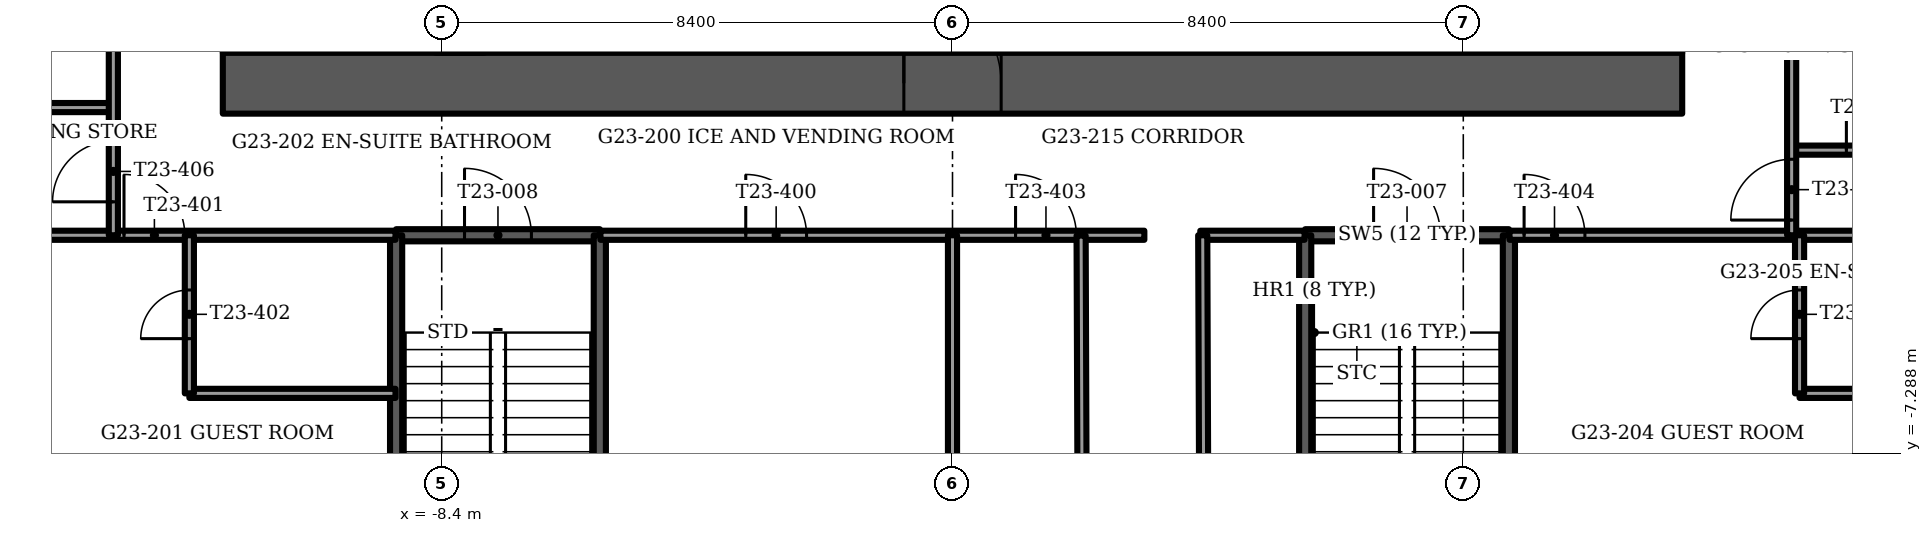
"""IFC4 building model, lengths in metres.
Left out: names, types, materials, properties, quantities, classifications, styles, units other than length and angle.
Written with IfcOpenShell. Run it as: python <this file> out.ifc"""

import sys

from ifc_helpers import new_model, si_unit, direction, frame, frame_2d, origin, place, context, subcontext, project, spatial, rectangle, extrude, element, fill, save


model = new_model("IFC4")
c1 = context("Model", 3, precision=1e-05, world=origin(), true_north=direction((0.0, 1.0)))
c2 = subcontext(c1, "Body", "Model", "MODEL_VIEW")
j1 = project(units=[si_unit("LENGTHUNIT", "METRE"), si_unit("PLANEANGLEUNIT", "RADIAN")], contexts=[c1])
p1 = place(None, origin())
s1 = spatial("IfcSite", under=j1, at=p1, CompositionType="ELEMENT")
p2 = place(p1, origin())
s2 = spatial("IfcBuilding", under=s1, at=p2, CompositionType="ELEMENT")
p3 = place(p2, frame((0.0, 0.0, 93.0)))
s3 = spatial("IfcBuildingStorey", under=s2, at=p3, CompositionType="ELEMENT", Elevation=93.0)
p4 = place(p3, frame((-12.0, -1.2, -0.3), z_axis=(0.0, 0.0, 1.0), x_axis=(1.0, 0.0, 0.0)))
e1 = element("IfcWall", 1, at=p4, inside=s3, PredefinedType="SHEAR", context=c2, shape_type="SweptSolid", body=[
    extrude(rectangle(XDim=24.0, YDim=1.0, at=frame_2d((12.0, 0.0))), origin(), (0.0, 0.0, 1.0), 3.75),
])
p5 = place(p4, frame((11.2, 0.0, 0.0)))
e2 = element("IfcOpeningElement", 2, at=p5, cuts=e1, PredefinedType="OPENING", context=c2, shape_type="SweptSolid", body=[
    extrude(rectangle(XDim=1.6, YDim=2.1, at=frame_2d((0.8, 1.05))), frame((0.0, 0.5, 0.0), z_axis=(0.0, -1.0, 0.0), x_axis=(1.0, 0.0, 0.0)), (0.0, 0.0, 1.0), 1.0),
])
p6 = place(p3, frame((-19.141, -0.696, 0.0), z_axis=(0.0, 0.0, 1.0), x_axis=(0.500002662854, -0.86602386638, 0.0)))
e3 = element("IfcWall", 3, at=p6, inside=s3, PredefinedType="SOLIDWALL", context=c2, shape_type="SweptSolid", body=[
    extrude(rectangle(XDim=11.615, YDim=0.15, at=frame_2d((5.807, 0.0))), origin(), (0.0, 0.0, 1.0), 3.45),
])
p7 = place(p6, frame((3.792, 0.0, 0.15)))
e4 = element("IfcOpeningElement", 4, at=p7, cuts=e3, PredefinedType="OPENING", context=c2, shape_type="SweptSolid", body=[
    extrude(rectangle(XDim=1.7, YDim=2.2, at=frame_2d((0.85, 1.1))), frame((0.0, 0.075, 0.0), z_axis=(0.0, -1.0, 0.0), x_axis=(1.0, 0.0, 0.0)), (0.0, 0.0, 1.0), 0.15),
])
p8 = place(p6, frame((9.531, 0.0, 0.15)))
e5 = element("IfcOpeningElement", 5, at=p8, cuts=e3, PredefinedType="OPENING", context=c2, shape_type="SweptSolid", body=[
    extrude(rectangle(XDim=0.9, YDim=2.2, at=frame_2d((0.45, 1.1))), frame((0.0, 0.075, 0.0), z_axis=(0.0, -1.0, 0.0), x_axis=(1.0, 0.0, 0.0)), (0.0, 0.0, 1.0), 0.15),
])
p9 = place(p6, frame((7.98, 0.0, 0.0)))
e6 = element("IfcOpeningElement", 6, at=p9, cuts=e3, PredefinedType="OPENING", context=c2, shape_type="SweptSolid", body=[
    extrude(rectangle(XDim=1.5, YDim=2.4, at=frame_2d((0.75, 1.2))), frame((0.0, 0.075, 0.0), z_axis=(0.0, -1.0, 0.0), x_axis=(1.0, 0.0, 0.0)), (0.0, 0.0, 1.0), 0.15),
])
p10 = place(p3, frame((13.334, -10.755, 0.0), z_axis=(0.0, 0.0, 1.0), x_axis=(0.500002662854, 0.86602386638, 0.0)))
e7 = element("IfcWall", 7, at=p10, inside=s3, PredefinedType="SOLIDWALL", context=c2, shape_type="SweptSolid", body=[
    extrude(rectangle(XDim=11.615, YDim=0.15, at=frame_2d((5.807, 0.0))), origin(), (0.0, 0.0, 1.0), 3.45),
])
p11 = place(p10, frame((0.847, 0.0, 0.15)))
e8 = element("IfcOpeningElement", 8, at=p11, cuts=e7, PredefinedType="OPENING", context=c2, shape_type="SweptSolid", body=[
    extrude(rectangle(XDim=1.7, YDim=2.2, at=frame_2d((0.85, 1.1))), frame((0.0, 0.075, 0.0), z_axis=(0.0, -1.0, 0.0), x_axis=(1.0, 0.0, 0.0)), (0.0, 0.0, 1.0), 0.15),
])
p12 = place(p10, frame((6.322, 0.0, 0.15)))
e9 = element("IfcOpeningElement", 9, at=p12, cuts=e7, PredefinedType="OPENING", context=c2, shape_type="SweptSolid", body=[
    extrude(rectangle(XDim=1.5, YDim=2.2, at=frame_2d((0.75, 1.1))), frame((0.0, 0.075, 0.0), z_axis=(0.0, -1.0, 0.0), x_axis=(1.0, 0.0, 0.0)), (0.0, 0.0, 1.0), 0.15),
])
for number, where, z_axis, x_axis in (
    (10, (-5.75, -0.7, 0.0), (0.0, 0.0, 1.0), (0.0, 1.0, 0.0)),
    (11, (5.75, -0.7, 0.0), (0.0, 0.0, 1.0), (0.0, 1.0, 0.0)),
):
    element("IfcWall", number, at=place(p3, frame(where, z_axis=z_axis, x_axis=x_axis)), inside=s3, PredefinedType="PARTITIONING", context=c2, shape_type="SweptSolid", body=[
        extrude(rectangle(XDim=1.6, YDim=0.15, at=frame_2d((0.8, 0.0))), origin(), (0.0, 0.0, 1.0), 3.45),
    ])
p13 = place(p3, frame((5.8, -3.7, -0.3), z_axis=(0.0, 0.0, 1.0), x_axis=(1.0, 0.0, 0.0)))
e12 = element("IfcWall", 12, at=p13, inside=s3, PredefinedType="SOLIDWALL", context=c2, shape_type="SweptSolid", body=[
    extrude(rectangle(XDim=3.35, YDim=0.2, at=frame_2d((1.675, 0.0))), origin(), (0.0, 0.0, 1.0), 3.75),
])
p14 = place(p13, frame((1.125, 0.0, 0.0)))
e13 = element("IfcOpeningElement", 13, at=p14, cuts=e12, PredefinedType="OPENING", context=c2, shape_type="SweptSolid", body=[
    extrude(rectangle(XDim=1.1, YDim=2.1, at=frame_2d((0.55, 1.05))), frame((0.0, 0.1, 0.0), z_axis=(0.0, -1.0, 0.0), x_axis=(1.0, 0.0, 0.0)), (0.0, 0.0, 1.0), 0.2),
])
for number, where, z_axis, x_axis in (
    (14, (5.8, -3.7, -0.3), (0.0, 0.0, 1.0), (0.0, -1.0, 0.0)),
    (15, (9.15, -3.7, -0.3), (0.0, 0.0, 1.0), (0.0, -1.0, 0.0)),
):
    element("IfcWall", number, at=place(p3, frame(where, z_axis=z_axis, x_axis=x_axis)), inside=s3, PredefinedType="SOLIDWALL", context=c2, shape_type="SweptSolid", body=[
        extrude(rectangle(XDim=7.7, YDim=0.2, at=frame_2d((3.85, 0.0))), origin(), (0.0, 0.0, 1.0), 3.75),
    ])
p15 = place(p3, frame((-9.15, -3.7, -0.3), z_axis=(0.0, 0.0, 1.0), x_axis=(1.0, 0.0, 0.0)))
e16 = element("IfcWall", 16, at=p15, inside=s3, PredefinedType="SOLIDWALL", context=c2, shape_type="SweptSolid", body=[
    extrude(rectangle(XDim=3.35, YDim=0.2, at=frame_2d((1.675, 0.0))), origin(), (0.0, 0.0, 1.0), 3.75),
])
p16 = place(p15, frame((1.125, 0.0, 0.0)))
e17 = element("IfcOpeningElement", 17, at=p16, cuts=e16, PredefinedType="OPENING", context=c2, shape_type="SweptSolid", body=[
    extrude(rectangle(XDim=1.1, YDim=2.1, at=frame_2d((0.55, 1.05))), frame((0.0, 0.1, 0.0), z_axis=(0.0, -1.0, 0.0), x_axis=(1.0, 0.0, 0.0)), (0.0, 0.0, 1.0), 0.2),
])
for number, where, z_axis, x_axis in (
    (18, (-9.15, -3.7, -0.3), (0.0, 0.0, 1.0), (0.0, -1.0, 0.0)),
    (19, (-5.8, -3.7, -0.3), (0.0, 0.0, 1.0), (0.0, -1.0, 0.0)),
):
    element("IfcWall", number, at=place(p3, frame(where, z_axis=z_axis, x_axis=x_axis)), inside=s3, PredefinedType="SOLIDWALL", context=c2, shape_type="SweptSolid", body=[
        extrude(rectangle(XDim=7.7, YDim=0.2, at=frame_2d((3.85, 0.0))), origin(), (0.0, 0.0, 1.0), 3.75),
    ])
p17 = place(p3, frame((-12.55, -6.3, 0.0), z_axis=(0.0, 0.0, 1.0), x_axis=(1.0, 0.0, 0.0)))
e20 = element("IfcWall", 20, at=p17, inside=s3, PredefinedType="PARTITIONING", context=c2, shape_type="SweptSolid", body=[
    extrude(rectangle(XDim=3.39, YDim=0.15, at=frame_2d((1.695, 0.0))), origin(), (0.0, 0.0, 1.0), 3.45),
])
p18 = place(p3, frame((13.93, -6.3, 0.0), z_axis=(0.0, 0.0, 1.0), x_axis=(1.0, 0.0, 0.0)))
e21 = element("IfcWall", 21, at=p18, inside=s3, PredefinedType="PARTITIONING", context=c2, shape_type="SweptSolid", body=[
    extrude(rectangle(XDim=2.028, YDim=0.15, at=frame_2d((1.014, 0.0))), origin(), (0.0, 0.0, 1.0), 3.45),
])
p19 = place(p3, frame((-17.459, -3.7, 0.0), z_axis=(0.0, 0.0, 1.0), x_axis=(1.0, 0.0, 0.0)))
e22 = element("IfcWall", 22, at=p19, inside=s3, PredefinedType="PARTITIONING", context=c2, shape_type="SweptSolid", body=[
    extrude(rectangle(XDim=8.299, YDim=0.15, at=frame_2d((4.149, 0.0))), origin(), (0.0, 0.0, 1.0), 3.45),
])
p20 = place(p19, frame((3.834, 0.0, 0.0)))
e23 = element("IfcOpeningElement", 23, at=p20, cuts=e22, PredefinedType="OPENING", context=c2, shape_type="SweptSolid", body=[
    extrude(rectangle(XDim=1.0, YDim=2.1, at=frame_2d((0.5, 1.05))), frame((0.0, 0.075, 0.0), z_axis=(0.0, -1.0, 0.0), x_axis=(1.0, 0.0, 0.0)), (0.0, 0.0, 1.0), 0.15),
])
p21 = place(p3, frame((-5.79, -3.7, 0.0), z_axis=(0.0, 0.0, 1.0), x_axis=(1.0, 0.0, 0.0)))
e24 = element("IfcWall", 24, at=p21, inside=s3, PredefinedType="PARTITIONING", context=c2, shape_type="SweptSolid", body=[
    extrude(rectangle(XDim=8.945, YDim=0.15, at=frame_2d((4.473, 0.0))), origin(), (0.0, 0.0, 1.0), 3.45),
])
p22 = place(p21, frame((2.39, 0.0, 0.0)))
e25 = element("IfcOpeningElement", 25, at=p22, cuts=e24, PredefinedType="OPENING", context=c2, shape_type="SweptSolid", body=[
    extrude(rectangle(XDim=1.0, YDim=2.1, at=frame_2d((0.5, 1.05))), frame((0.0, 0.075, 0.0), z_axis=(0.0, -1.0, 0.0), x_axis=(1.0, 0.0, 0.0)), (0.0, 0.0, 1.0), 0.15),
])
p23 = place(p21, frame((6.827, 0.0, 0.0)))
e26 = element("IfcOpeningElement", 26, at=p23, cuts=e24, PredefinedType="OPENING", context=c2, shape_type="SweptSolid", body=[
    extrude(rectangle(XDim=1.0, YDim=2.1, at=frame_2d((0.5, 1.05))), frame((0.0, 0.075, 0.0), z_axis=(0.0, -1.0, 0.0), x_axis=(1.0, 0.0, 0.0)), (0.0, 0.0, 1.0), 0.15),
])
p24 = place(p3, frame((4.075, -3.7, 0.0), z_axis=(0.0, 0.0, 1.0), x_axis=(1.0, 0.0, 0.0)))
e27 = element("IfcWall", 27, at=p24, inside=s3, PredefinedType="PARTITIONING", context=c2, shape_type="SweptSolid", body=[
    extrude(rectangle(XDim=1.715, YDim=0.15, at=frame_2d((0.857, 0.0))), origin(), (0.0, 0.0, 1.0), 3.45),
])
p25 = place(p3, frame((9.16, -3.7, 0.0), z_axis=(0.0, 0.0, 1.0), x_axis=(1.0, 0.0, 0.0)))
e28 = element("IfcWall", 28, at=p25, inside=s3, PredefinedType="PARTITIONING", context=c2, shape_type="SweptSolid", body=[
    extrude(rectangle(XDim=8.299, YDim=0.15, at=frame_2d((4.149, 0.0))), origin(), (0.0, 0.0, 1.0), 3.45),
])
p26 = place(p25, frame((0.24, 0.0, 0.0)))
e29 = element("IfcOpeningElement", 29, at=p26, cuts=e28, PredefinedType="OPENING", context=c2, shape_type="SweptSolid", body=[
    extrude(rectangle(XDim=1.0, YDim=2.1, at=frame_2d((0.5, 1.05))), frame((0.0, 0.075, 0.0), z_axis=(0.0, -1.0, 0.0), x_axis=(1.0, 0.0, 0.0)), (0.0, 0.0, 1.0), 0.15),
])
p27 = place(p3, frame((13.8, -2.3, 0.0), z_axis=(0.0, 0.0, 1.0), x_axis=(1.0, 0.0, 0.0)))
e30 = element("IfcWall", 30, at=p27, inside=s3, PredefinedType="PARTITIONING", context=c2, shape_type="SweptSolid", body=[
    extrude(rectangle(XDim=2.6, YDim=0.15, at=frame_2d((1.3, 0.0))), origin(), (0.0, 0.0, 1.0), 3.45),
])
p28 = place(p27, frame((0.9, 0.0, 0.0)))
e31 = element("IfcOpeningElement", 31, at=p28, cuts=e30, PredefinedType="OPENING", context=c2, shape_type="SweptSolid", body=[
    extrude(rectangle(XDim=0.8, YDim=2.1, at=frame_2d((0.4, 1.05))), frame((0.0, 0.075, 0.0), z_axis=(0.0, -1.0, 0.0), x_axis=(1.0, 0.0, 0.0)), (0.0, 0.0, 1.0), 0.15),
])
p29 = place(p3, frame((-18.672, -1.6, 0.0), z_axis=(0.0, 0.0, 1.0), x_axis=(1.0, 0.0, 0.0)))
e32 = element("IfcWall", 32, at=p29, inside=s3, PredefinedType="PARTITIONING", context=c2, shape_type="SweptSolid", body=[
    extrude(rectangle(XDim=4.872, YDim=0.15, at=frame_2d((2.436, 0.0))), origin(), (0.0, 0.0, 1.0), 3.45),
])
p30 = place(p3, frame((13.93, -6.3, 0.0), z_axis=(0.0, 0.0, 1.0), x_axis=(0.0, 1.0, 0.0)))
e33 = element("IfcWall", 33, at=p30, inside=s3, PredefinedType="PARTITIONING", context=c2, shape_type="SweptSolid", body=[
    extrude(rectangle(XDim=2.6, YDim=0.15, at=frame_2d((1.3, 0.0))), origin(), (0.0, 0.0, 1.0), 3.45),
])
p31 = place(p30, frame((0.9, 0.0, 0.0)))
e34 = element("IfcOpeningElement", 34, at=p31, cuts=e33, PredefinedType="OPENING", context=c2, shape_type="SweptSolid", body=[
    extrude(rectangle(XDim=0.8, YDim=2.1, at=frame_2d((0.4, 1.05))), frame((0.0, 0.075, 0.0), z_axis=(0.0, -1.0, 0.0), x_axis=(1.0, 0.0, 0.0)), (0.0, 0.0, 1.0), 0.15),
])
p32 = place(p3, frame((13.8, -3.7, 0.0), z_axis=(0.0, 0.0, 1.0), x_axis=(0.0, 1.0, 0.0)))
e35 = element("IfcWall", 35, at=p32, inside=s3, PredefinedType="PARTITIONING", context=c2, shape_type="SweptSolid", body=[
    extrude(rectangle(XDim=13.41, YDim=0.15, at=frame_2d((6.705, 0.0))), origin(), (0.0, 0.0, 1.0), 3.45),
])
p33 = place(p32, frame((0.25, 0.0, 0.0)))
e36 = element("IfcOpeningElement", 36, at=p33, cuts=e35, PredefinedType="OPENING", context=c2, shape_type="SweptSolid", body=[
    extrude(rectangle(XDim=1.0, YDim=2.1, at=frame_2d((0.5, 1.05))), frame((0.0, 0.075, 0.0), z_axis=(0.0, -1.0, 0.0), x_axis=(1.0, 0.0, 0.0)), (0.0, 0.0, 1.0), 0.15),
])
p34 = place(p32, frame((8.183, 0.0, 0.0)))
e37 = element("IfcOpeningElement", 37, at=p34, cuts=e35, PredefinedType="OPENING", context=c2, shape_type="SweptSolid", body=[
    extrude(rectangle(XDim=1.0, YDim=2.1, at=frame_2d((0.5, 1.05))), frame((0.0, 0.075, 0.0), z_axis=(0.0, -1.0, 0.0), x_axis=(1.0, 0.0, 0.0)), (0.0, 0.0, 1.0), 0.15),
])
p35 = place(p3, frame((0.0, -9.01, 0.0), z_axis=(0.0, 0.0, 1.0), x_axis=(0.0, 1.0, 0.0)))
e38 = element("IfcWall", 38, at=p35, inside=s3, PredefinedType="PARTITIONING", context=c2, shape_type="SweptSolid", body=[
    extrude(rectangle(XDim=5.31, YDim=0.15, at=frame_2d((2.655, 0.0))), origin(), (0.0, 0.0, 1.0), 3.45),
])
p36 = place(p3, frame((-12.55, -6.3, 0.0), z_axis=(0.0, 0.0, 1.0), x_axis=(0.0, 1.0, 0.0)))
e39 = element("IfcWall", 39, at=p36, inside=s3, PredefinedType="PARTITIONING", context=c2, shape_type="SweptSolid", body=[
    extrude(rectangle(XDim=2.6, YDim=0.15, at=frame_2d((1.3, 0.0))), origin(), (0.0, 0.0, 1.0), 3.45),
])
p37 = place(p36, frame((0.9, 0.0, 0.0)))
e40 = element("IfcOpeningElement", 40, at=p37, cuts=e39, PredefinedType="OPENING", context=c2, shape_type="SweptSolid", body=[
    extrude(rectangle(XDim=0.8, YDim=2.1, at=frame_2d((0.4, 1.05))), frame((0.0, 0.075, 0.0), z_axis=(0.0, -1.0, 0.0), x_axis=(1.0, 0.0, 0.0)), (0.0, 0.0, 1.0), 0.15),
])
p38 = place(p3, frame((-13.8, -3.7, 0.0), z_axis=(0.0, 0.0, 1.0), x_axis=(0.0, 1.0, 0.0)))
e41 = element("IfcWall", 41, at=p38, inside=s3, PredefinedType="PARTITIONING", context=c2, shape_type="SweptSolid", body=[
    extrude(rectangle(XDim=13.41, YDim=0.15, at=frame_2d((6.705, 0.0))), origin(), (0.0, 0.0, 1.0), 3.45),
])
p39 = place(p38, frame((0.55, 0.0, 0.0)))
e42 = element("IfcOpeningElement", 42, at=p39, cuts=e41, PredefinedType="OPENING", context=c2, shape_type="SweptSolid", body=[
    extrude(rectangle(XDim=1.0, YDim=2.1, at=frame_2d((0.5, 1.05))), frame((0.0, 0.075, 0.0), z_axis=(0.0, -1.0, 0.0), x_axis=(1.0, 0.0, 0.0)), (0.0, 0.0, 1.0), 0.15),
])
p40 = place(p38, frame((3.7, 0.0, 0.0)))
e43 = element("IfcOpeningElement", 43, at=p40, cuts=e41, PredefinedType="OPENING", context=c2, shape_type="SweptSolid", body=[
    extrude(rectangle(XDim=1.0, YDim=2.1, at=frame_2d((0.5, 1.05))), frame((0.0, 0.075, 0.0), z_axis=(0.0, -1.0, 0.0), x_axis=(1.0, 0.0, 0.0)), (0.0, 0.0, 1.0), 0.15),
])
p41 = place(p38, frame((9.233, 0.0, 0.0)))
e44 = element("IfcOpeningElement", 44, at=p41, cuts=e41, PredefinedType="OPENING", context=c2, shape_type="SweptSolid", body=[
    extrude(rectangle(XDim=1.0, YDim=2.1, at=frame_2d((0.5, 1.05))), frame((0.0, 0.075, 0.0), z_axis=(0.0, -1.0, 0.0), x_axis=(1.0, 0.0, 0.0)), (0.0, 0.0, 1.0), 0.15),
])
p42 = place(p3, frame((4.134, -8.87, 0.0), z_axis=(0.0, 0.0, 1.0), x_axis=(-0.003683216269, 0.999993216936, 0.0)))
e45 = element("IfcWall", 45, at=p42, inside=s3, PredefinedType="PARTITIONING", context=c2, shape_type="SweptSolid", body=[
    extrude(rectangle(XDim=5.17, YDim=0.15, at=frame_2d((2.585, 0.0))), origin(), (0.0, 0.0, 1.0), 3.45),
])
p43 = place(p3, frame((2.134, -8.87, 0.0), z_axis=(0.0, 0.0, 1.0), x_axis=(-0.003686872276, 0.999993203463, 0.0)))
e46 = element("IfcWall", 46, at=p43, inside=s3, PredefinedType="PARTITIONING", context=c2, shape_type="SweptSolid", body=[
    extrude(rectangle(XDim=5.165, YDim=0.15, at=frame_2d((2.583, 0.0))), origin(), (0.0, 0.0, 1.0), 3.45),
])
p44 = place(p5, origin())
e47 = element("IfcDoor", 47, at=p44, inside=s3, OperationType="DOUBLE_DOOR_SINGLE_SWING", PredefinedType="DOOR", context=c2, shape_type="SweptSolid", body=[
    extrude(rectangle(XDim=1.6, YDim=2.1, at=frame_2d((0.8, 1.05))), frame((0.0, 0.025, 0.0), z_axis=(0.0, -1.0, 0.0), x_axis=(1.0, 0.0, 0.0)), (0.0, 0.0, 1.0), 0.05),
])
fill(e2, e47)
p45 = place(p14, origin())
e48 = element("IfcDoor", 48, at=p45, inside=s3, OperationType="SINGLE_SWING_LEFT", PredefinedType="DOOR", context=c2, shape_type="SweptSolid", body=[
    extrude(rectangle(XDim=1.1, YDim=2.1, at=frame_2d((0.55, 1.05))), frame((0.0, 0.025, 0.0), z_axis=(0.0, -1.0, 0.0), x_axis=(1.0, 0.0, 0.0)), (0.0, 0.0, 1.0), 0.05),
])
fill(e13, e48)
p46 = place(p16, origin())
e49 = element("IfcDoor", 49, at=p46, inside=s3, OperationType="SINGLE_SWING_LEFT", PredefinedType="DOOR", context=c2, shape_type="SweptSolid", body=[
    extrude(rectangle(XDim=1.1, YDim=2.1, at=frame_2d((0.55, 1.05))), frame((0.0, 0.025, 0.0), z_axis=(0.0, -1.0, 0.0), x_axis=(1.0, 0.0, 0.0)), (0.0, 0.0, 1.0), 0.05),
])
fill(e17, e49)
p47 = place(p22, origin())
e50 = element("IfcDoor", 50, at=p47, inside=s3, OperationType="SINGLE_SWING_RIGHT", PredefinedType="DOOR", context=c2, shape_type="SweptSolid", body=[
    extrude(rectangle(XDim=1.0, YDim=2.1, at=frame_2d((0.5, 1.05))), frame((0.0, 0.025, 0.0), z_axis=(0.0, -1.0, 0.0), x_axis=(1.0, 0.0, 0.0)), (0.0, 0.0, 1.0), 0.05),
])
fill(e25, e50)
p48 = place(p20, origin())
e51 = element("IfcDoor", 51, at=p48, inside=s3, OperationType="SINGLE_SWING_LEFT", PredefinedType="DOOR", context=c2, shape_type="SweptSolid", body=[
    extrude(rectangle(XDim=1.0, YDim=2.1, at=frame_2d((0.5, 1.05))), frame((0.0, 0.025, 0.0), z_axis=(0.0, -1.0, 0.0), x_axis=(1.0, 0.0, 0.0)), (0.0, 0.0, 1.0), 0.05),
])
fill(e23, e51)
p49 = place(p37, origin())
e52 = element("IfcDoor", 52, at=p49, inside=s3, OperationType="SINGLE_SWING_RIGHT", PredefinedType="DOOR", context=c2, shape_type="SweptSolid", body=[
    extrude(rectangle(XDim=0.8, YDim=2.1, at=frame_2d((0.4, 1.05))), frame((0.0, 0.025, 0.0), z_axis=(0.0, -1.0, 0.0), x_axis=(1.0, 0.0, 0.0)), (0.0, 0.0, 1.0), 0.05),
])
fill(e40, e52)
p50 = place(p23, origin())
e53 = element("IfcDoor", 53, at=p50, inside=s3, OperationType="SINGLE_SWING_LEFT", PredefinedType="DOOR", context=c2, shape_type="SweptSolid", body=[
    extrude(rectangle(XDim=1.0, YDim=2.1, at=frame_2d((0.5, 1.05))), frame((0.0, 0.025, 0.0), z_axis=(0.0, -1.0, 0.0), x_axis=(1.0, 0.0, 0.0)), (0.0, 0.0, 1.0), 0.05),
])
fill(e26, e53)
p51 = place(p26, origin())
e54 = element("IfcDoor", 54, at=p51, inside=s3, OperationType="SINGLE_SWING_LEFT", PredefinedType="DOOR", context=c2, shape_type="SweptSolid", body=[
    extrude(rectangle(XDim=1.0, YDim=2.1, at=frame_2d((0.5, 1.05))), frame((0.0, 0.025, 0.0), z_axis=(0.0, -1.0, 0.0), x_axis=(1.0, 0.0, 0.0)), (0.0, 0.0, 1.0), 0.05),
])
fill(e29, e54)
p52 = place(p31, origin())
e55 = element("IfcDoor", 55, at=p52, inside=s3, OperationType="SINGLE_SWING_RIGHT", PredefinedType="DOOR", context=c2, shape_type="SweptSolid", body=[
    extrude(rectangle(XDim=0.8, YDim=2.1, at=frame_2d((0.4, 1.05))), frame((0.0, 0.025, 0.0), z_axis=(0.0, -1.0, 0.0), x_axis=(1.0, 0.0, 0.0)), (0.0, 0.0, 1.0), 0.05),
])
fill(e34, e55)
p53 = place(p39, origin())
e56 = element("IfcDoor", 56, at=p53, inside=s3, OperationType="SINGLE_SWING_LEFT", PredefinedType="DOOR", context=c2, shape_type="SweptSolid", body=[
    extrude(rectangle(XDim=1.0, YDim=2.1, at=frame_2d((0.5, 1.05))), frame((0.0, 0.025, 0.0), z_axis=(0.0, -1.0, 0.0), x_axis=(1.0, 0.0, 0.0)), (0.0, 0.0, 1.0), 0.05),
])
fill(e42, e56)
p54 = place(p33, origin())
e57 = element("IfcDoor", 57, at=p54, inside=s3, OperationType="SINGLE_SWING_LEFT", PredefinedType="DOOR", context=c2, shape_type="SweptSolid", body=[
    extrude(rectangle(XDim=1.0, YDim=2.1, at=frame_2d((0.5, 1.05))), frame((0.0, 0.025, 0.0), z_axis=(0.0, -1.0, 0.0), x_axis=(1.0, 0.0, 0.0)), (0.0, 0.0, 1.0), 0.05),
])
fill(e36, e57)
p55 = place(p28, origin())
e58 = element("IfcDoor", 58, at=p55, inside=s3, OperationType="SINGLE_SWING_LEFT", PredefinedType="DOOR", context=c2, shape_type="SweptSolid", body=[
    extrude(rectangle(XDim=0.8, YDim=2.1, at=frame_2d((0.4, 1.05))), frame((0.0, 0.025, 0.0), z_axis=(0.0, -1.0, 0.0), x_axis=(1.0, 0.0, 0.0)), (0.0, 0.0, 1.0), 0.05),
])
fill(e31, e58)
save(model, sys.argv[1])
